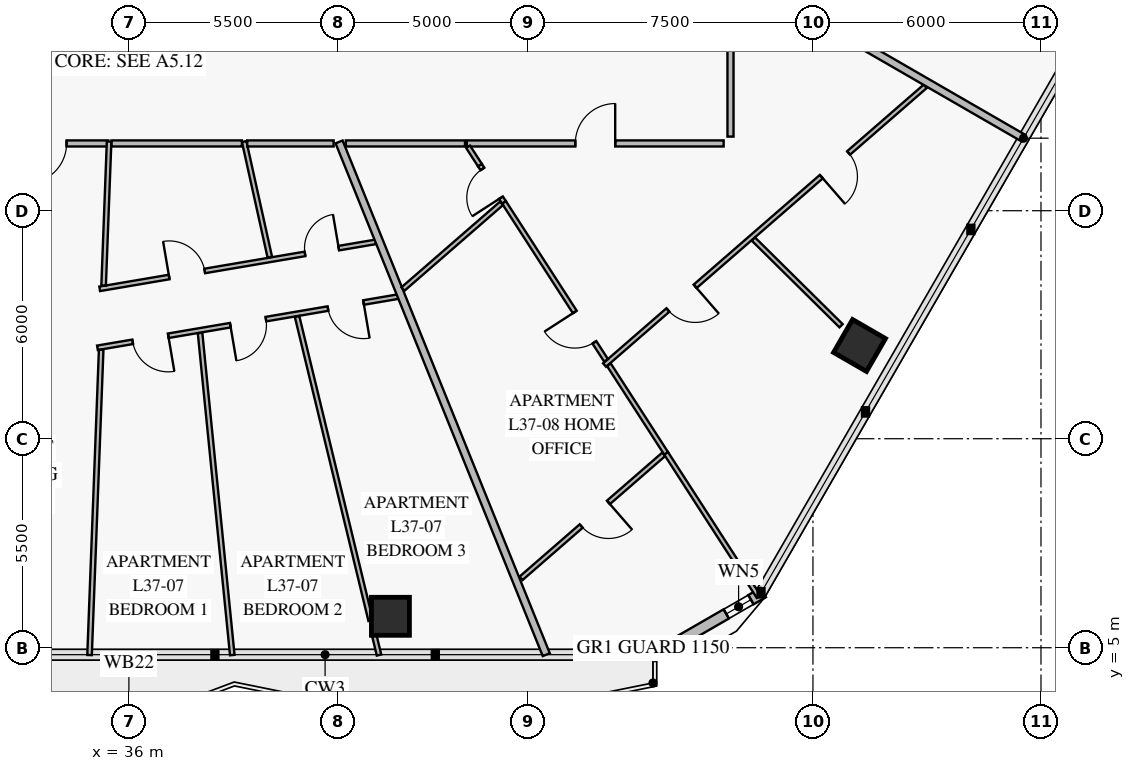
"""IFC4 building model, lengths in metres.
Left out: names, types, materials, properties, quantities, classifications, styles, units other than length and angle.
Written with IfcOpenShell. Run it as: python <this file> out.ifc"""

import sys

from ifc_helpers import new_model, si_unit, direction, frame, frame_2d, origin, origin_2d, place, context, subcontext, project, spatial, rectangle, extrude, element, fill, save


model = new_model("IFC4")
c1 = context("Model", 3, precision=1e-05, world=origin(), true_north=direction((0.0, 1.0)))
c2 = subcontext(c1, "Body", "Model", "MODEL_VIEW")
j1 = project(units=[si_unit("LENGTHUNIT", "METRE"), si_unit("PLANEANGLEUNIT", "RADIAN")], contexts=[c1])
p1 = place(None, origin())
s1 = spatial("IfcSite", under=j1, at=p1, CompositionType="ELEMENT")
p2 = place(p1, origin())
s2 = spatial("IfcBuilding", under=s1, at=p2, CompositionType="ELEMENT")
p3 = place(p2, frame((0.0, 0.0, 150.4)))
s3 = spatial("IfcBuildingStorey", under=s2, at=p3, CompositionType="ELEMENT", Elevation=150.4)
for number, where, z_axis, x_axis in (
    (1, (42.882, 5.827, 0.0), (0.0, 0.0, 1.0), (1.0, 0.0, 0.0)),
    (2, (55.226, 12.953, 0.0), (0.0, 0.0, 1.0), (0.5, 0.866, 0.0)),
):
    element("IfcColumn", number, at=place(p3, frame(where, z_axis=z_axis, x_axis=x_axis)), inside=s3, PredefinedType="COLUMN", context=c2, shape_type="SweptSolid", body=[
        extrude(rectangle(XDim=1.0, YDim=1.0, at=origin_2d()), origin(), (0.0, 0.0, 1.0), 3.55),
    ])
p4 = place(p3, frame((52.693, 6.452, 0.0), z_axis=(0.0, 0.0, 1.0), x_axis=(-0.866020068361, -0.500009241111, 0.0)))
e3 = element("IfcWall", 3, at=p4, inside=s3, PredefinedType="SOLIDWALL", context=c2, shape_type="SweptSolid", body=[
    extrude(rectangle(XDim=3.365, YDim=0.28, at=frame_2d((1.683, 0.0))), origin(), (0.0, 0.0, 1.0), 3.55),
])
p5 = place(p4, frame((0.375, 0.0, 0.85)))
e4 = element("IfcOpeningElement", 4, at=p5, cuts=e3, PredefinedType="OPENING", context=c2, shape_type="SweptSolid", body=[
    extrude(rectangle(XDim=0.75, YDim=1.5, at=frame_2d((0.375, 0.75))), frame((0.0, 0.152, 0.0), z_axis=(0.0, -1.0, 0.0), x_axis=(1.0, 0.0, 0.0)), (0.0, 0.0, 1.0), 0.304),
])
p6 = place(p3, frame((35.232, 14.444, 0.0), z_axis=(0.0, 0.0, 1.0), x_axis=(0.985819661596, 0.167808208412, 0.0)))
e5 = element("IfcWall", 5, at=p6, inside=s3, PredefinedType="PARTITIONING", context=c2, shape_type="SweptSolid", body=[
    extrude(rectangle(XDim=7.407, YDim=0.12, at=frame_2d((3.703, 0.0))), origin(), (0.0, 0.0, 1.0), 2.9),
])
p7 = place(p6, frame((1.854, 0.0, 0.0)))
e6 = element("IfcOpeningElement", 6, at=p7, cuts=e5, PredefinedType="OPENING", context=c2, shape_type="SweptSolid", body=[
    extrude(rectangle(XDim=0.95, YDim=2.1, at=frame_2d((0.475, 1.05))), frame((0.0, 0.072, 0.0), z_axis=(0.0, -1.0, 0.0), x_axis=(1.0, 0.0, 0.0)), (0.0, 0.0, 1.0), 0.144),
])
p8 = place(p6, frame((5.48, 0.0, 0.0)))
e7 = element("IfcOpeningElement", 7, at=p8, cuts=e5, PredefinedType="OPENING", context=c2, shape_type="SweptSolid", body=[
    extrude(rectangle(XDim=0.9, YDim=2.1, at=frame_2d((0.45, 1.05))), frame((0.0, 0.072, 0.0), z_axis=(0.0, -1.0, 0.0), x_axis=(1.0, 0.0, 0.0)), (0.0, 0.0, 1.0), 0.144),
])
p9 = place(p3, frame((35.173, 12.892, 0.0), z_axis=(0.0, 0.0, 1.0), x_axis=(0.985819567417, 0.167808761684, 0.0)))
e8 = element("IfcWall", 8, at=p9, inside=s3, PredefinedType="PARTITIONING", context=c2, shape_type="SweptSolid", body=[
    extrude(rectangle(XDim=8.044, YDim=0.12, at=frame_2d((4.022, 0.0))), origin(), (0.0, 0.0, 1.0), 2.9),
])
p10 = place(p9, frame((0.941, 0.0, 0.0)))
e9 = element("IfcOpeningElement", 9, at=p10, cuts=e8, PredefinedType="OPENING", context=c2, shape_type="SweptSolid", body=[
    extrude(rectangle(XDim=0.95, YDim=2.1, at=frame_2d((0.475, 1.05))), frame((0.0, 0.072, 0.0), z_axis=(0.0, -1.0, 0.0), x_axis=(1.0, 0.0, 0.0)), (0.0, 0.0, 1.0), 0.144),
])
p11 = place(p9, frame((3.547, 0.0, 0.0)))
e10 = element("IfcOpeningElement", 10, at=p11, cuts=e8, PredefinedType="OPENING", context=c2, shape_type="SweptSolid", body=[
    extrude(rectangle(XDim=0.95, YDim=2.1, at=frame_2d((0.475, 1.05))), frame((0.0, 0.072, 0.0), z_axis=(0.0, -1.0, 0.0), x_axis=(1.0, 0.0, 0.0)), (0.0, 0.0, 1.0), 0.144),
])
p12 = place(p9, frame((6.153, 0.0, 0.0)))
e11 = element("IfcOpeningElement", 11, at=p12, cuts=e8, PredefinedType="OPENING", context=c2, shape_type="SweptSolid", body=[
    extrude(rectangle(XDim=0.95, YDim=2.1, at=frame_2d((0.475, 1.05))), frame((0.0, 0.072, 0.0), z_axis=(0.0, -1.0, 0.0), x_axis=(1.0, 0.0, 0.0)), (0.0, 0.0, 1.0), 0.144),
])
p13 = place(p3, frame((32.213, 18.27, 0.0), z_axis=(0.0, 0.0, 1.0), x_axis=(1.0, 0.0, 0.0)))
e12 = element("IfcWall", 12, at=p13, inside=s3, PredefinedType="PARTITIONING", context=c2, shape_type="SweptSolid", body=[
    extrude(rectangle(XDim=3.244, YDim=0.16, at=frame_2d((1.622, 0.0))), origin(), (0.0, 0.0, 1.0), 2.9),
])
p14 = place(p13, frame((1.097, 0.0, 0.0)))
e13 = element("IfcOpeningElement", 13, at=p14, cuts=e12, PredefinedType="OPENING", context=c2, shape_type="SweptSolid", body=[
    extrude(rectangle(XDim=1.05, YDim=2.15, at=frame_2d((0.525, 1.075))), frame((0.0, 0.092, 0.0), z_axis=(0.0, -1.0, 0.0), x_axis=(1.0, 0.0, 0.0)), (0.0, 0.0, 1.0), 0.184),
])
p15 = place(p3, frame((48.517, 12.438, 0.0), z_axis=(0.0, 0.0, 1.0), x_axis=(0.754704710889, 0.656064630476, 0.0)))
e14 = element("IfcWall", 14, at=p15, inside=s3, PredefinedType="PARTITIONING", context=c2, shape_type="SweptSolid", body=[
    extrude(rectangle(XDim=11.18, YDim=0.12, at=frame_2d((5.59, 0.0))), origin(), (0.0, 0.0, 1.0), 2.9),
])
p16 = place(p15, frame((2.208, 0.0, 0.0)))
e15 = element("IfcOpeningElement", 15, at=p16, cuts=e14, PredefinedType="OPENING", context=c2, shape_type="SweptSolid", body=[
    extrude(rectangle(XDim=0.95, YDim=2.1, at=frame_2d((0.475, 1.05))), frame((0.0, 0.072, 0.0), z_axis=(0.0, -1.0, 0.0), x_axis=(1.0, 0.0, 0.0)), (0.0, 0.0, 1.0), 0.144),
])
p17 = place(p15, frame((7.558, 0.0, 0.0)))
e16 = element("IfcOpeningElement", 16, at=p17, cuts=e14, PredefinedType="OPENING", context=c2, shape_type="SweptSolid", body=[
    extrude(rectangle(XDim=0.95, YDim=2.1, at=frame_2d((0.475, 1.05))), frame((0.0, 0.072, 0.0), z_axis=(0.0, -1.0, 0.0), x_axis=(1.0, 0.0, 0.0)), (0.0, 0.0, 1.0), 0.144),
])
p18 = place(p3, frame((45.237, 17.7, 0.0), z_axis=(0.0, 0.0, 1.0), x_axis=(0.542645136481, -0.839962056199, 0.0)))
e17 = element("IfcWall", 17, at=p18, inside=s3, PredefinedType="PARTITIONING", context=c2, shape_type="SweptSolid", body=[
    extrude(rectangle(XDim=1.169, YDim=0.12, at=frame_2d((0.585, 0.0))), origin(), (0.0, 0.0, 1.0), 3.55),
])
p19 = place(p18, frame((0.121, 0.0, 0.0)))
e18 = element("IfcOpeningElement", 18, at=p19, cuts=e17, PredefinedType="OPENING", context=c2, shape_type="SweptSolid", body=[
    extrude(rectangle(XDim=0.9, YDim=2.1, at=frame_2d((0.45, 1.05))), frame((0.0, 0.072, 0.0), z_axis=(0.0, -1.0, 0.0), x_axis=(1.0, 0.0, 0.0)), (0.0, 0.0, 1.0), 0.144),
])
p20 = place(p3, frame((45.871, 16.718, 0.0), z_axis=(0.0, 0.0, 1.0), x_axis=(0.54259218167, -0.83999626451, 0.0)))
e19 = element("IfcWall", 19, at=p20, inside=s3, PredefinedType="PARTITIONING", context=c2, shape_type="SweptSolid", body=[
    extrude(rectangle(XDim=4.947, YDim=0.12, at=frame_2d((2.473, 0.0))), origin(), (0.0, 0.0, 1.0), 3.55),
])
p21 = place(p20, frame((3.432, 0.0, 0.0)))
e20 = element("IfcOpeningElement", 20, at=p21, cuts=e19, PredefinedType="OPENING", context=c2, shape_type="SweptSolid", body=[
    extrude(rectangle(XDim=0.95, YDim=2.1, at=frame_2d((0.475, 1.05))), frame((0.0, 0.072, 0.0), z_axis=(0.0, -1.0, 0.0), x_axis=(1.0, 0.0, 0.0)), (0.0, 0.0, 1.0), 0.144),
])
p22 = place(p3, frame((48.63, 12.447, 0.0), z_axis=(0.0, 0.0, 1.0), x_axis=(0.5425590103, -0.840017690494, 0.0)))
e21 = element("IfcWall", 21, at=p22, inside=s3, PredefinedType="PARTITIONING", context=c2, shape_type="SweptSolid", body=[
    extrude(rectangle(XDim=2.779, YDim=0.12, at=frame_2d((1.39, 0.0))), origin(), (0.0, 0.0, 1.0), 3.55),
])
p23 = place(p3, frame((46.319, 6.826, 0.0), z_axis=(0.0, 0.0, 1.0), x_axis=(0.754719650471, 0.656047444315, 0.0)))
e22 = element("IfcWall", 22, at=p23, inside=s3, PredefinedType="PARTITIONING", context=c2, shape_type="SweptSolid", body=[
    extrude(rectangle(XDim=4.973, YDim=0.12, at=frame_2d((2.487, 0.0))), origin(), (0.0, 0.0, 1.0), 2.87),
])
p24 = place(p23, frame((2.096, 0.0, 0.0)))
e23 = element("IfcOpeningElement", 23, at=p24, cuts=e22, PredefinedType="OPENING", context=c2, shape_type="SweptSolid", body=[
    extrude(rectangle(XDim=0.95, YDim=2.1, at=frame_2d((0.475, 1.05))), frame((0.0, 0.072, 0.0), z_axis=(0.0, -1.0, 0.0), x_axis=(1.0, 0.0, 0.0)), (0.0, 0.0, 1.0), 0.144),
])
p25 = place(p3, frame((44.893, 18.27, 0.0), z_axis=(0.0, 0.0, 1.0), x_axis=(1.0, 0.0, 0.0)))
e24 = element("IfcWall", 24, at=p25, inside=s3, PredefinedType="PARTITIONING", context=c2, shape_type="SweptSolid", body=[
    extrude(rectangle(XDim=6.757, YDim=0.16, at=frame_2d((3.379, 0.0))), origin(), (0.0, 0.0, 1.0), 2.9),
])
p26 = place(p25, frame((2.854, 0.0, 0.0)))
e25 = element("IfcOpeningElement", 25, at=p26, cuts=e24, PredefinedType="OPENING", context=c2, shape_type="SweptSolid", body=[
    extrude(rectangle(XDim=1.05, YDim=2.15, at=frame_2d((0.525, 1.075))), frame((0.0, 0.092, 0.0), z_axis=(0.0, -1.0, 0.0), x_axis=(1.0, 0.0, 0.0)), (0.0, 0.0, 1.0), 0.184),
])
p27 = place(p3, frame((39.033, 18.32, 0.0), z_axis=(0.0, 0.0, 1.0), x_axis=(0.216516027093, -0.976279063594, 0.0)))
e26 = element("IfcWall", 26, at=p27, inside=s3, PredefinedType="PARTITIONING", context=c2, shape_type="SweptSolid", body=[
    extrude(rectangle(XDim=3.119, YDim=0.12, at=frame_2d((1.56, 0.0))), origin(), (0.0, 0.0, 1.0), 3.55),
])
p28 = place(p3, frame((37.873, 13.283, 0.0), z_axis=(0.0, 0.0, 1.0), x_axis=(0.099568986872, -0.995030661263, 0.0)))
e27 = element("IfcWall", 27, at=p28, inside=s3, PredefinedType="PARTITIONING", context=c2, shape_type="SweptSolid", body=[
    extrude(rectangle(XDim=8.518, YDim=0.12, at=frame_2d((4.259, 0.0))), origin(), (0.0, 0.0, 1.0), 2.87),
])
p29 = place(p3, frame((40.425, 13.717, 0.0), z_axis=(0.0, 0.0, 1.0), x_axis=(0.235264736648, -0.971931326633, 0.0)))
e28 = element("IfcWall", 28, at=p29, inside=s3, PredefinedType="PARTITIONING", context=c2, shape_type="SweptSolid", body=[
    extrude(rectangle(XDim=8.232, YDim=0.12, at=frame_2d((4.116, 0.0))), origin(), (0.0, 0.0, 1.0), 2.87),
])
p30 = place(p3, frame((42.461, 5.307, 0.0), z_axis=(0.0, 0.0, 1.0), x_axis=(0.23538270084, -0.971902764759, 0.0)))
e29 = element("IfcWall", 29, at=p30, inside=s3, PredefinedType="PARTITIONING", context=c2, shape_type="SweptSolid", body=[
    extrude(rectangle(XDim=0.514, YDim=0.12, at=frame_2d((0.257, 0.0))), origin(), (0.0, 0.0, 1.0), 3.55),
])
p31 = place(p3, frame((35.479, 18.32, 0.0), z_axis=(0.0, 0.0, 1.0), x_axis=(-0.03804986936, -0.999275841518, 0.0)))
e30 = element("IfcWall", 30, at=p31, inside=s3, PredefinedType="PARTITIONING", context=c2, shape_type="SweptSolid", body=[
    extrude(rectangle(XDim=3.792, YDim=0.12, at=frame_2d((1.896, 0.0))), origin(), (0.0, 0.0, 1.0), 3.55),
])
p32 = place(p3, frame((35.271, 12.84, 0.0), z_axis=(0.0, 0.0, 1.0), x_axis=(-0.038054050692, -0.999275682295, 0.0)))
e31 = element("IfcWall", 31, at=p32, inside=s3, PredefinedType="PARTITIONING", context=c2, shape_type="SweptSolid", body=[
    extrude(rectangle(XDim=8.039, YDim=0.12, at=frame_2d((4.02, 0.0))), origin(), (0.0, 0.0, 1.0), 2.87),
])
p33 = place(p3, frame((41.531, 18.31, 0.0), z_axis=(0.0, 0.0, 1.0), x_axis=(0.374610610646, -0.92718223149, 0.0)))
e32 = element("IfcWall", 32, at=p33, inside=s3, PredefinedType="PARTITIONING", context=c2, shape_type="SweptSolid", body=[
    extrude(rectangle(XDim=14.553, YDim=0.2, at=frame_2d((7.276, 0.0))), origin(), (0.0, 0.0, 1.0), 2.87),
])
p34 = place(p3, frame((52.433, 15.753, 0.0), z_axis=(0.0, 0.0, 1.0), x_axis=(0.711123375878, -0.703067240227, 0.0)))
e33 = element("IfcWall", 33, at=p34, inside=s3, PredefinedType="PARTITIONING", context=c2, shape_type="SweptSolid", body=[
    extrude(rectangle(XDim=3.243, YDim=0.12, at=frame_2d((1.621, 0.0))), origin(), (0.0, 0.0, 1.0), 2.9),
])
p35 = place(p3, frame((44.926, 18.182, 0.0), z_axis=(0.0, 0.0, 1.0), x_axis=(0.542562967044, -0.840015134859, 0.0)))
e34 = element("IfcWall", 34, at=p35, inside=s3, PredefinedType="PARTITIONING", context=c2, shape_type="SweptSolid", body=[
    extrude(rectangle(XDim=0.574, YDim=0.12, at=frame_2d((0.287, 0.0))), origin(), (0.0, 0.0, 1.0), 3.55),
])
p36 = place(p3, frame((50.138, 10.113, 0.0), z_axis=(0.0, 0.0, 1.0), x_axis=(0.54259903081, -0.839991840296, 0.0)))
e35 = element("IfcWall", 35, at=p36, inside=s3, PredefinedType="PARTITIONING", context=c2, shape_type="SweptSolid", body=[
    extrude(rectangle(XDim=4.486, YDim=0.12, at=frame_2d((2.243, 0.0))), origin(), (0.0, 0.0, 1.0), 2.87),
])
p37 = place(p3, frame((43.212, 14.439, 0.0), z_axis=(0.0, 0.0, 1.0), x_axis=(0.754711017703, 0.656057375355, 0.0)))
e36 = element("IfcWall", 36, at=p37, inside=s3, PredefinedType="PARTITIONING", context=c2, shape_type="SweptSolid", body=[
    extrude(rectangle(XDim=3.438, YDim=0.12, at=frame_2d((1.719, 0.0))), origin(), (0.0, 0.0, 1.0), 3.55),
])
p38 = place(p3, frame((46.858, 25.731, 0.0), z_axis=(0.0, 0.0, 1.0), x_axis=(0.866024853997, -0.500000952259, 0.0)))
e37 = element("IfcWall", 37, at=p38, inside=s3, PredefinedType="PARTITIONING", context=c2, shape_type="SweptSolid", body=[
    extrude(rectangle(XDim=14.646, YDim=0.2, at=frame_2d((7.323, 0.0))), origin(), (0.0, 0.0, 1.0), 2.87),
])
p39 = place(p3, frame((35.545, 18.27, 0.0), z_axis=(0.0, 0.0, 1.0), x_axis=(1.0, 0.0, 0.0)))
e38 = element("IfcWall", 38, at=p39, inside=s3, PredefinedType="PARTITIONING", context=c2, shape_type="SweptSolid", body=[
    extrude(rectangle(XDim=3.429, YDim=0.16, at=frame_2d((1.715, 0.0))), origin(), (0.0, 0.0, 1.0), 3.55),
])
p40 = place(p3, frame((39.114, 18.27, 0.0), z_axis=(0.0, 0.0, 1.0), x_axis=(1.0, 0.0, 0.0)))
e39 = element("IfcWall", 39, at=p40, inside=s3, PredefinedType="PARTITIONING", context=c2, shape_type="SweptSolid", body=[
    extrude(rectangle(XDim=2.273, YDim=0.16, at=frame_2d((1.136, 0.0))), origin(), (0.0, 0.0, 1.0), 2.9),
])
p41 = place(p3, frame((51.83, 18.45, 0.0), z_axis=(0.0, 0.0, 1.0), x_axis=(0.0, 1.0, 0.0)))
e40 = element("IfcWall", 40, at=p41, inside=s3, PredefinedType="PARTITIONING", context=c2, shape_type="SweptSolid", body=[
    extrude(rectangle(XDim=3.7, YDim=0.16, at=frame_2d((1.85, 0.0))), origin(), (0.0, 0.0, 1.0), 3.15),
])
p42 = place(p3, frame((41.709, 18.27, 0.0), z_axis=(0.0, 0.0, 1.0), x_axis=(1.0, 0.0, 0.0)))
e41 = element("IfcWall", 41, at=p42, inside=s3, PredefinedType="PARTITIONING", context=c2, shape_type="SweptSolid", body=[
    extrude(rectangle(XDim=3.136, YDim=0.16, at=frame_2d((1.568, 0.0))), origin(), (0.0, 0.0, 1.0), 3.55),
])
p43 = place(p5, origin())
e42 = element("IfcWindow", 42, at=p43, inside=s3, PartitioningType="SINGLE_PANEL", PredefinedType="WINDOW", context=c2, shape_type="SweptSolid", body=[
    extrude(rectangle(XDim=0.75, YDim=1.5, at=frame_2d((0.375, 0.75))), frame((0.0, 0.03, 0.0), z_axis=(0.0, -1.0, 0.0), x_axis=(1.0, 0.0, 0.0)), (0.0, 0.0, 1.0), 0.06),
])
fill(e4, e42)
p44 = place(p7, origin())
e43 = element("IfcDoor", 43, at=p44, inside=s3, OperationType="SINGLE_SWING_LEFT", PredefinedType="DOOR", context=c2, shape_type="SweptSolid", body=[
    extrude(rectangle(XDim=0.95, YDim=2.1, at=frame_2d((0.475, 1.05))), frame((0.0, 0.025, 0.0), z_axis=(0.0, -1.0, 0.0), x_axis=(1.0, 0.0, 0.0)), (0.0, 0.0, 1.0), 0.05),
])
fill(e6, e43)
p45 = place(p8, origin())
e44 = element("IfcDoor", 44, at=p45, inside=s3, OperationType="SINGLE_SWING_RIGHT", PredefinedType="DOOR", context=c2, shape_type="SweptSolid", body=[
    extrude(rectangle(XDim=0.9, YDim=2.1, at=frame_2d((0.45, 1.05))), frame((0.0, 0.025, 0.0), z_axis=(0.0, -1.0, 0.0), x_axis=(1.0, 0.0, 0.0)), (0.0, 0.0, 1.0), 0.05),
])
fill(e7, e44)
p46 = place(p10, frame((0.95, 0.0, 0.0), z_axis=(0.0, 0.0, 1.0), x_axis=(-1.0, 0.0, 0.0)))
e45 = element("IfcDoor", 45, at=p46, inside=s3, OperationType="SINGLE_SWING_LEFT", PredefinedType="DOOR", context=c2, shape_type="SweptSolid", body=[
    extrude(rectangle(XDim=0.95, YDim=2.1, at=frame_2d((0.475, 1.05))), frame((0.0, 0.025, 0.0), z_axis=(0.0, -1.0, 0.0), x_axis=(1.0, 0.0, 0.0)), (0.0, 0.0, 1.0), 0.05),
])
fill(e9, e45)
p47 = place(p11, frame((0.95, 0.0, 0.0), z_axis=(0.0, 0.0, 1.0), x_axis=(-1.0, 0.0, 0.0)))
e46 = element("IfcDoor", 46, at=p47, inside=s3, OperationType="SINGLE_SWING_RIGHT", PredefinedType="DOOR", context=c2, shape_type="SweptSolid", body=[
    extrude(rectangle(XDim=0.95, YDim=2.1, at=frame_2d((0.475, 1.05))), frame((0.0, 0.025, 0.0), z_axis=(0.0, -1.0, 0.0), x_axis=(1.0, 0.0, 0.0)), (0.0, 0.0, 1.0), 0.05),
])
fill(e10, e46)
p48 = place(p12, frame((0.95, 0.0, 0.0), z_axis=(0.0, 0.0, 1.0), x_axis=(-1.0, 0.0, 0.0)))
e47 = element("IfcDoor", 47, at=p48, inside=s3, OperationType="SINGLE_SWING_LEFT", PredefinedType="DOOR", context=c2, shape_type="SweptSolid", body=[
    extrude(rectangle(XDim=0.95, YDim=2.1, at=frame_2d((0.475, 1.05))), frame((0.0, 0.025, 0.0), z_axis=(0.0, -1.0, 0.0), x_axis=(1.0, 0.0, 0.0)), (0.0, 0.0, 1.0), 0.05),
])
fill(e11, e47)
p49 = place(p14, frame((1.05, 0.0, 0.0), z_axis=(0.0, 0.0, 1.0), x_axis=(-1.0, 0.0, 0.0)))
e48 = element("IfcDoor", 48, at=p49, inside=s3, OperationType="SINGLE_SWING_RIGHT", PredefinedType="DOOR", context=c2, shape_type="SweptSolid", body=[
    extrude(rectangle(XDim=1.05, YDim=2.15, at=frame_2d((0.525, 1.075))), frame((0.0, 0.025, 0.0), z_axis=(0.0, -1.0, 0.0), x_axis=(1.0, 0.0, 0.0)), (0.0, 0.0, 1.0), 0.05),
])
fill(e13, e48)
p50 = place(p16, frame((0.95, 0.0, 0.0), z_axis=(0.0, 0.0, 1.0), x_axis=(-1.0, 0.0, 0.0)))
e49 = element("IfcDoor", 49, at=p50, inside=s3, OperationType="SINGLE_SWING_LEFT", PredefinedType="DOOR", context=c2, shape_type="SweptSolid", body=[
    extrude(rectangle(XDim=0.95, YDim=2.1, at=frame_2d((0.475, 1.05))), frame((0.0, 0.025, 0.0), z_axis=(0.0, -1.0, 0.0), x_axis=(1.0, 0.0, 0.0)), (0.0, 0.0, 1.0), 0.05),
])
fill(e15, e49)
p51 = place(p17, frame((0.95, 0.0, 0.0), z_axis=(0.0, 0.0, 1.0), x_axis=(-1.0, 0.0, 0.0)))
e50 = element("IfcDoor", 50, at=p51, inside=s3, OperationType="SINGLE_SWING_RIGHT", PredefinedType="DOOR", context=c2, shape_type="SweptSolid", body=[
    extrude(rectangle(XDim=0.95, YDim=2.1, at=frame_2d((0.475, 1.05))), frame((0.0, 0.025, 0.0), z_axis=(0.0, -1.0, 0.0), x_axis=(1.0, 0.0, 0.0)), (0.0, 0.0, 1.0), 0.05),
])
fill(e16, e50)
p52 = place(p19, frame((0.9, 0.0, 0.0), z_axis=(0.0, 0.0, 1.0), x_axis=(-1.0, 0.0, 0.0)))
e51 = element("IfcDoor", 51, at=p52, inside=s3, OperationType="SINGLE_SWING_LEFT", PredefinedType="DOOR", context=c2, shape_type="SweptSolid", body=[
    extrude(rectangle(XDim=0.9, YDim=2.1, at=frame_2d((0.45, 1.05))), frame((0.0, 0.025, 0.0), z_axis=(0.0, -1.0, 0.0), x_axis=(1.0, 0.0, 0.0)), (0.0, 0.0, 1.0), 0.05),
])
fill(e18, e51)
p53 = place(p21, frame((0.95, 0.0, 0.0), z_axis=(0.0, 0.0, 1.0), x_axis=(-1.0, 0.0, 0.0)))
e52 = element("IfcDoor", 52, at=p53, inside=s3, OperationType="SINGLE_SWING_RIGHT", PredefinedType="DOOR", context=c2, shape_type="SweptSolid", body=[
    extrude(rectangle(XDim=0.95, YDim=2.1, at=frame_2d((0.475, 1.05))), frame((0.0, 0.025, 0.0), z_axis=(0.0, -1.0, 0.0), x_axis=(1.0, 0.0, 0.0)), (0.0, 0.0, 1.0), 0.05),
])
fill(e20, e52)
p54 = place(p24, frame((0.95, 0.0, 0.0), z_axis=(0.0, 0.0, 1.0), x_axis=(-1.0, 0.0, 0.0)))
e53 = element("IfcDoor", 53, at=p54, inside=s3, OperationType="SINGLE_SWING_LEFT", PredefinedType="DOOR", context=c2, shape_type="SweptSolid", body=[
    extrude(rectangle(XDim=0.95, YDim=2.1, at=frame_2d((0.475, 1.05))), frame((0.0, 0.025, 0.0), z_axis=(0.0, -1.0, 0.0), x_axis=(1.0, 0.0, 0.0)), (0.0, 0.0, 1.0), 0.05),
])
fill(e23, e53)
p55 = place(p26, origin())
e54 = element("IfcDoor", 54, at=p55, inside=s3, OperationType="SINGLE_SWING_RIGHT", PredefinedType="DOOR", context=c2, shape_type="SweptSolid", body=[
    extrude(rectangle(XDim=1.05, YDim=2.15, at=frame_2d((0.525, 1.075))), frame((0.0, 0.025, 0.0), z_axis=(0.0, -1.0, 0.0), x_axis=(1.0, 0.0, 0.0)), (0.0, 0.0, 1.0), 0.05),
])
fill(e25, e54)
save(model, sys.argv[1])
